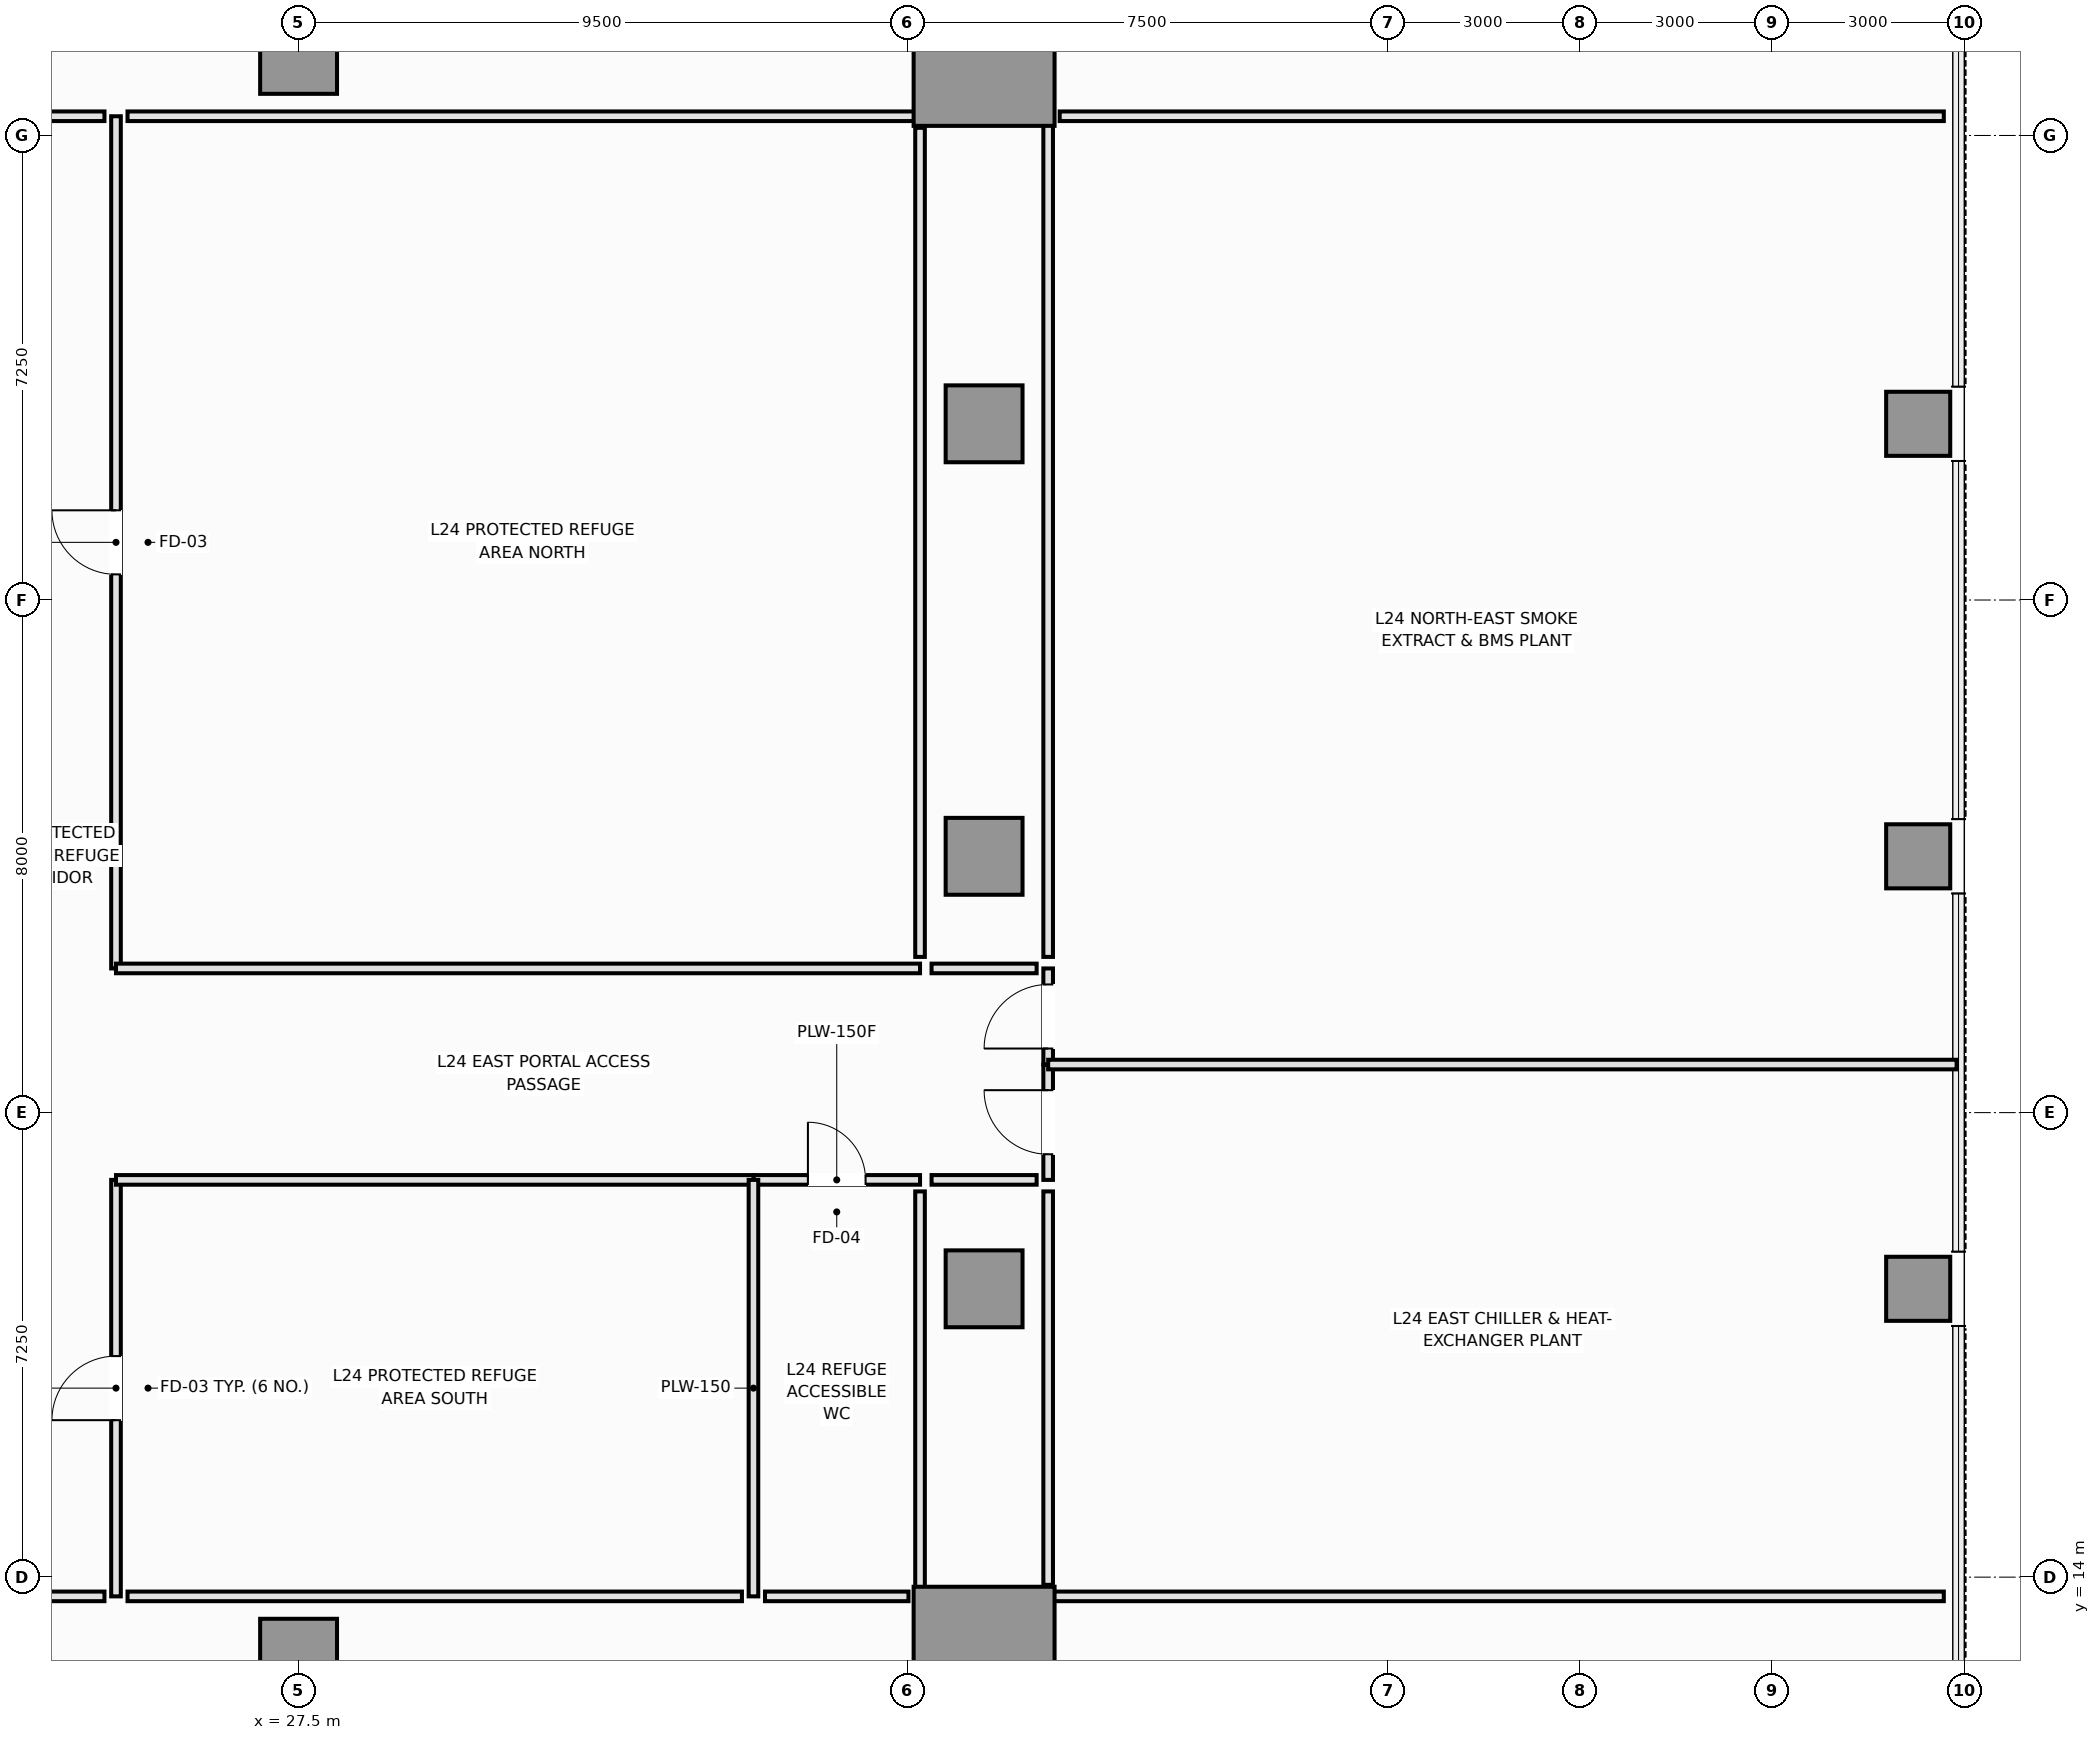
"""IFC4 building model, lengths in metres.
Left out: names, types, materials, properties, quantities, classifications, styles, units other than length and angle.
Written with IfcOpenShell. Run it as: python <this file> out.ifc"""

import sys

from ifc_helpers import new_model, si_unit, direction, frame, frame_2d, origin, origin_2d, place, context, subcontext, project, spatial, rectangle, extrude, element, fill, save


model = new_model("IFC4")
c1 = context("Model", 3, precision=1e-05, world=origin(), true_north=direction((0.0, 1.0)))
c2 = subcontext(c1, "Body", "Model", "MODEL_VIEW")
j1 = project(units=[si_unit("LENGTHUNIT", "METRE"), si_unit("PLANEANGLEUNIT", "RADIAN")], contexts=[c1])
p1 = place(None, origin())
s1 = spatial("IfcSite", under=j1, at=p1, CompositionType="ELEMENT")
p2 = place(p1, origin())
s2 = spatial("IfcBuilding", under=s1, at=p2, CompositionType="ELEMENT")
p3 = place(p2, frame((0.0, 0.0, 93.05)))
s3 = spatial("IfcBuildingStorey", under=s2, at=p3, CompositionType="ELEMENT", Elevation=93.05)
for number, where, z_axis, x_axis in (
    (1, (38.2, 12.75, 0.0), (0.0, 0.0, 1.0), (1.0, 0.0, 0.0)),
    (2, (38.2, 37.75, 0.0), (0.0, 0.0, 1.0), (1.0, 0.0, 0.0)),
):
    element("IfcColumn", number, at=place(p3, frame(where, z_axis=z_axis, x_axis=x_axis)), inside=s3, PredefinedType="COLUMN", context=c2, shape_type="SweptSolid", body=[
        extrude(rectangle(XDim=2.2, YDim=2.2, at=origin_2d()), origin(), (0.0, 0.0, 1.0), 4.8),
    ])
for number, where, z_axis, x_axis in (
    (3, (27.5, 12.75, 0.0), (0.0, 0.0, 1.0), (1.0, 0.0, 0.0)),
    (4, (27.5, 37.75, 0.0), (0.0, 0.0, 1.0), (1.0, 0.0, 0.0)),
    (5, (38.2, 18.5, 0.0), (0.0, 0.0, 1.0), (1.0, 0.0, 0.0)),
    (6, (38.2, 25.25, 0.0), (0.0, 0.0, 1.0), (1.0, 0.0, 0.0)),
    (7, (38.2, 32.0, 0.0), (0.0, 0.0, 1.0), (1.0, 0.0, 0.0)),
):
    element("IfcColumn", number, at=place(p3, frame(where, z_axis=z_axis, x_axis=x_axis)), inside=s3, PredefinedType="COLUMN", context=c2, shape_type="SweptSolid", body=[
        extrude(rectangle(XDim=1.2, YDim=1.2, at=origin_2d()), origin(), (0.0, 0.0, 1.0), 4.8),
    ])
for number, where, z_axis, x_axis in (
    (8, (52.78, 18.5, 0.0), (0.0, 0.0, 1.0), (1.0, 0.0, 0.0)),
    (9, (52.78, 25.25, 0.0), (0.0, 0.0, 1.0), (1.0, 0.0, 0.0)),
    (10, (52.78, 32.0, 0.0), (0.0, 0.0, 1.0), (1.0, 0.0, 0.0)),
):
    element("IfcColumn", number, at=place(p3, frame(where, z_axis=z_axis, x_axis=x_axis)), inside=s3, PredefinedType="COLUMN", context=c2, shape_type="SweptSolid", body=[
        extrude(rectangle(XDim=1.0, YDim=1.0, at=origin_2d()), origin(), (0.0, 0.0, 1.0), 4.8),
    ])
p4 = place(p3, frame((24.65, 13.7, 0.0), z_axis=(0.0, 0.0, 1.0), x_axis=(0.0, 1.0, 0.0)))
e11 = element("IfcWall", 11, at=p4, inside=s3, PredefinedType="PARTITIONING", context=c2, shape_type="SweptSolid", body=[
    extrude(rectangle(XDim=6.5, YDim=0.15, at=frame_2d((3.25, 0.0))), origin(), (0.0, 0.0, 1.0), 4.62),
])
p5 = place(p4, frame((2.75, 0.0, 0.0)))
e12 = element("IfcOpeningElement", 12, at=p5, cuts=e11, PredefinedType="OPENING", context=c2, shape_type="SweptSolid", body=[
    extrude(rectangle(XDim=1.0, YDim=2.15, at=frame_2d((0.5, 1.075))), frame((0.0, 0.085, 0.0), z_axis=(0.0, -1.0, 0.0), x_axis=(1.0, 0.0, 0.0)), (0.0, 0.0, 1.0), 0.17),
])
p6 = place(p3, frame((24.65, 23.5, 0.0), z_axis=(0.0, 0.0, 1.0), x_axis=(0.0, 1.0, 0.0)))
e13 = element("IfcWall", 13, at=p6, inside=s3, PredefinedType="PARTITIONING", context=c2, shape_type="SweptSolid", body=[
    extrude(rectangle(XDim=13.3, YDim=0.15, at=frame_2d((6.65, 0.0))), origin(), (0.0, 0.0, 1.0), 4.62),
])
p7 = place(p6, frame((6.15, 0.0, 0.0)))
e14 = element("IfcOpeningElement", 14, at=p7, cuts=e13, PredefinedType="OPENING", context=c2, shape_type="SweptSolid", body=[
    extrude(rectangle(XDim=1.0, YDim=2.15, at=frame_2d((0.5, 1.075))), frame((0.0, 0.085, 0.0), z_axis=(0.0, -1.0, 0.0), x_axis=(1.0, 0.0, 0.0)), (0.0, 0.0, 1.0), 0.17),
])
p8 = place(p3, frame((34.6, 20.2, 0.0), z_axis=(0.0, 0.0, 1.0), x_axis=(1.0, 0.0, 0.0)))
e15 = element("IfcWall", 15, at=p8, inside=s3, PredefinedType="PLUMBINGWALL", context=c2, shape_type="SweptSolid", body=[
    extrude(rectangle(XDim=2.6, YDim=0.15, at=frame_2d((1.3, 0.0))), origin(), (0.0, 0.0, 1.0), 4.62),
])
p9 = place(p8, frame((0.85, 0.0, 0.0)))
e16 = element("IfcOpeningElement", 16, at=p9, cuts=e15, PredefinedType="OPENING", context=c2, shape_type="SweptSolid", body=[
    extrude(rectangle(XDim=0.9, YDim=2.1, at=frame_2d((0.45, 1.05))), frame((0.0, 0.085, 0.0), z_axis=(0.0, -1.0, 0.0), x_axis=(1.0, 0.0, 0.0)), (0.0, 0.0, 1.0), 0.17),
])
p10 = place(p3, frame((24.65, 20.2, 0.0), z_axis=(0.0, 0.0, 1.0), x_axis=(1.0, 0.0, 0.0)))
e17 = element("IfcWall", 17, at=p10, inside=s3, PredefinedType="PARTITIONING", context=c2, shape_type="SweptSolid", body=[
    extrude(rectangle(XDim=9.95, YDim=0.15, at=frame_2d((4.975, 0.0))), origin(), (0.0, 0.0, 1.0), 4.62),
])
p11 = place(p3, frame((24.65, 23.5, 0.0), z_axis=(0.0, 0.0, 1.0), x_axis=(1.0, 0.0, 0.0)))
e18 = element("IfcWall", 18, at=p11, inside=s3, PredefinedType="PARTITIONING", context=c2, shape_type="SweptSolid", body=[
    extrude(rectangle(XDim=12.55, YDim=0.15, at=frame_2d((6.275, 0.0))), origin(), (0.0, 0.0, 1.0), 4.62),
])
p12 = place(p3, frame((39.2, 20.2, 0.0), z_axis=(0.0, 0.0, 1.0), x_axis=(0.0, 1.0, 0.0)))
e19 = element("IfcWall", 19, at=p12, inside=s3, PredefinedType="PARTITIONING", context=c2, shape_type="SweptSolid", body=[
    extrude(rectangle(XDim=1.8, YDim=0.15, at=frame_2d((0.9, 0.0))), origin(), (0.0, 0.0, 1.0), 4.62),
])
p13 = place(p12, frame((0.4, 0.0, 0.0)))
e20 = element("IfcOpeningElement", 20, at=p13, cuts=e19, PredefinedType="OPENING", context=c2, shape_type="SweptSolid", body=[
    extrude(rectangle(XDim=1.0, YDim=2.15, at=frame_2d((0.5, 1.075))), frame((0.0, 0.085, 0.0), z_axis=(0.0, -1.0, 0.0), x_axis=(1.0, 0.0, 0.0)), (0.0, 0.0, 1.0), 0.17),
])
p14 = place(p3, frame((39.2, 22.0, 0.0), z_axis=(0.0, 0.0, 1.0), x_axis=(0.0, 1.0, 0.0)))
e21 = element("IfcWall", 21, at=p14, inside=s3, PredefinedType="PARTITIONING", context=c2, shape_type="SweptSolid", body=[
    extrude(rectangle(XDim=1.5, YDim=0.15, at=frame_2d((0.75, 0.0))), origin(), (0.0, 0.0, 1.0), 4.62),
])
p15 = place(p14, frame((0.25, 0.0, 0.0)))
e22 = element("IfcOpeningElement", 22, at=p15, cuts=e21, PredefinedType="OPENING", context=c2, shape_type="SweptSolid", body=[
    extrude(rectangle(XDim=1.0, YDim=2.15, at=frame_2d((0.5, 1.075))), frame((0.0, 0.085, 0.0), z_axis=(0.0, -1.0, 0.0), x_axis=(1.0, 0.0, 0.0)), (0.0, 0.0, 1.0), 0.17),
])
p16 = place(p3, frame((34.6, 13.7, 0.0), z_axis=(0.0, 0.0, 1.0), x_axis=(0.0, 1.0, 0.0)))
e23 = element("IfcWall", 23, at=p16, inside=s3, PredefinedType="PLUMBINGWALL", context=c2, shape_type="SweptSolid", body=[
    extrude(rectangle(XDim=6.5, YDim=0.15, at=frame_2d((3.25, 0.0))), origin(), (0.0, 0.0, 1.0), 4.62),
])
p17 = place(p3, frame((39.2, 22.0, 0.0), z_axis=(0.0, 0.0, 1.0), x_axis=(1.0, 0.0, 0.0)))
e24 = element("IfcWall", 24, at=p17, inside=s3, PredefinedType="PARTITIONING", context=c2, shape_type="SweptSolid", body=[
    extrude(rectangle(XDim=14.18, YDim=0.15, at=frame_2d((7.09, 0.0))), origin(), (0.0, 0.0, 1.0), 4.62),
])
p18 = place(p3, frame((20.58, 36.8, 0.0), z_axis=(0.0, 0.0, 1.0), x_axis=(1.0, 0.0, 0.0)))
e25 = element("IfcWall", 25, at=p18, inside=s3, PredefinedType="PARTITIONING", context=c2, shape_type="SweptSolid", body=[
    extrude(rectangle(XDim=3.89, YDim=0.15, at=frame_2d((1.945, 0.0))), origin(), (0.0, 0.0, 1.0), 4.62),
])
p19 = place(p3, frame((24.83, 36.8, 0.0), z_axis=(0.0, 0.0, 1.0), x_axis=(1.0, 0.0, 0.0)))
e26 = element("IfcWall", 26, at=p19, inside=s3, PredefinedType="PARTITIONING", context=c2, shape_type="SweptSolid", body=[
    extrude(rectangle(XDim=12.37, YDim=0.15, at=frame_2d((6.185, 0.0))), origin(), (0.0, 0.0, 1.0), 4.62),
])
p20 = place(p3, frame((37.2, 36.62, 0.0), z_axis=(0.0, 0.0, 1.0), x_axis=(0.0, -1.0, 0.0)))
e27 = element("IfcWall", 27, at=p20, inside=s3, PredefinedType="PARTITIONING", context=c2, shape_type="SweptSolid", body=[
    extrude(rectangle(XDim=12.94, YDim=0.15, at=frame_2d((6.47, 0.0))), origin(), (0.0, 0.0, 1.0), 4.62),
])
p21 = place(p3, frame((37.38, 23.5, 0.0), z_axis=(0.0, 0.0, 1.0), x_axis=(1.0, 0.0, 0.0)))
e28 = element("IfcWall", 28, at=p21, inside=s3, PredefinedType="PARTITIONING", context=c2, shape_type="SweptSolid", body=[
    extrude(rectangle(XDim=1.64, YDim=0.15, at=frame_2d((0.82, 0.0))), origin(), (0.0, 0.0, 1.0), 4.62),
])
p22 = place(p3, frame((39.2, 23.68, 0.0), z_axis=(0.0, 0.0, 1.0), x_axis=(0.0, 1.0, 0.0)))
e29 = element("IfcWall", 29, at=p22, inside=s3, PredefinedType="PARTITIONING", context=c2, shape_type="SweptSolid", body=[
    extrude(rectangle(XDim=13.12, YDim=0.15, at=frame_2d((6.56, 0.0))), origin(), (0.0, 0.0, 1.0), 4.62),
])
p23 = place(p3, frame((39.38, 36.8, 0.0), z_axis=(0.0, 0.0, 1.0), x_axis=(1.0, 0.0, 0.0)))
e30 = element("IfcWall", 30, at=p23, inside=s3, PredefinedType="PARTITIONING", context=c2, shape_type="SweptSolid", body=[
    extrude(rectangle(XDim=13.8, YDim=0.15, at=frame_2d((6.9, 0.0))), origin(), (0.0, 0.0, 1.0), 4.62),
])
p24 = place(p3, frame((53.18, 13.7, 0.0), z_axis=(0.0, 0.0, 1.0), x_axis=(-1.0, 0.0, 0.0)))
e31 = element("IfcWall", 31, at=p24, inside=s3, PredefinedType="PARTITIONING", context=c2, shape_type="SweptSolid", body=[
    extrude(rectangle(XDim=13.98, YDim=0.15, at=frame_2d((6.99, 0.0))), origin(), (0.0, 0.0, 1.0), 4.62),
])
p25 = place(p3, frame((39.2, 13.88, 0.0), z_axis=(0.0, 0.0, 1.0), x_axis=(0.0, 1.0, 0.0)))
e32 = element("IfcWall", 32, at=p25, inside=s3, PredefinedType="PARTITIONING", context=c2, shape_type="SweptSolid", body=[
    extrude(rectangle(XDim=6.14, YDim=0.15, at=frame_2d((3.07, 0.0))), origin(), (0.0, 0.0, 1.0), 4.62),
])
p26 = place(p3, frame((39.02, 20.2, 0.0), z_axis=(0.0, 0.0, 1.0), x_axis=(-1.0, 0.0, 0.0)))
e33 = element("IfcWall", 33, at=p26, inside=s3, PredefinedType="PARTITIONING", context=c2, shape_type="SweptSolid", body=[
    extrude(rectangle(XDim=1.64, YDim=0.15, at=frame_2d((0.82, 0.0))), origin(), (0.0, 0.0, 1.0), 4.62),
])
p27 = place(p3, frame((37.2, 20.02, 0.0), z_axis=(0.0, 0.0, 1.0), x_axis=(0.0, -1.0, 0.0)))
e34 = element("IfcWall", 34, at=p27, inside=s3, PredefinedType="PARTITIONING", context=c2, shape_type="SweptSolid", body=[
    extrude(rectangle(XDim=6.32, YDim=0.15, at=frame_2d((3.16, 0.0))), origin(), (0.0, 0.0, 1.0), 4.62),
])
p28 = place(p3, frame((37.02, 13.7, 0.0), z_axis=(0.0, 0.0, 1.0), x_axis=(-1.0, 0.0, 0.0)))
e35 = element("IfcWall", 35, at=p28, inside=s3, PredefinedType="PARTITIONING", context=c2, shape_type="SweptSolid", body=[
    extrude(rectangle(XDim=2.24, YDim=0.15, at=frame_2d((1.12, 0.0))), origin(), (0.0, 0.0, 1.0), 4.62),
])
p29 = place(p3, frame((34.42, 13.7, 0.0), z_axis=(0.0, 0.0, 1.0), x_axis=(-1.0, 0.0, 0.0)))
e36 = element("IfcWall", 36, at=p29, inside=s3, PredefinedType="PARTITIONING", context=c2, shape_type="SweptSolid", body=[
    extrude(rectangle(XDim=9.59, YDim=0.15, at=frame_2d((4.795, 0.0))), origin(), (0.0, 0.0, 1.0), 4.62),
])
p30 = place(p3, frame((24.47, 13.7, 0.0), z_axis=(0.0, 0.0, 1.0), x_axis=(-1.0, 0.0, 0.0)))
e37 = element("IfcWall", 37, at=p30, inside=s3, PredefinedType="PARTITIONING", context=c2, shape_type="SweptSolid", body=[
    extrude(rectangle(XDim=4.07, YDim=0.15, at=frame_2d((2.035, 0.0))), origin(), (0.0, 0.0, 1.0), 4.62),
])
p31 = place(p5, origin())
e38 = element("IfcDoor", 38, at=p31, inside=s3, OperationType="SINGLE_SWING_LEFT", PredefinedType="DOOR", context=c2, shape_type="SweptSolid", body=[
    extrude(rectangle(XDim=1.0, YDim=2.15, at=frame_2d((0.5, 1.075))), frame((0.0, 0.025, 0.0), z_axis=(0.0, -1.0, 0.0), x_axis=(1.0, 0.0, 0.0)), (0.0, 0.0, 1.0), 0.05),
])
fill(e12, e38)
p32 = place(p7, origin())
e39 = element("IfcDoor", 39, at=p32, inside=s3, OperationType="SINGLE_SWING_RIGHT", PredefinedType="DOOR", context=c2, shape_type="SweptSolid", body=[
    extrude(rectangle(XDim=1.0, YDim=2.15, at=frame_2d((0.5, 1.075))), frame((0.0, 0.025, 0.0), z_axis=(0.0, -1.0, 0.0), x_axis=(1.0, 0.0, 0.0)), (0.0, 0.0, 1.0), 0.05),
])
fill(e14, e39)
p33 = place(p9, origin())
e40 = element("IfcDoor", 40, at=p33, inside=s3, OperationType="SINGLE_SWING_LEFT", PredefinedType="DOOR", context=c2, shape_type="SweptSolid", body=[
    extrude(rectangle(XDim=0.9, YDim=2.1, at=frame_2d((0.45, 1.05))), frame((0.0, 0.025, 0.0), z_axis=(0.0, -1.0, 0.0), x_axis=(1.0, 0.0, 0.0)), (0.0, 0.0, 1.0), 0.05),
])
fill(e16, e40)
p34 = place(p13, origin())
e41 = element("IfcDoor", 41, at=p34, inside=s3, OperationType="SINGLE_SWING_RIGHT", PredefinedType="DOOR", context=c2, shape_type="SweptSolid", body=[
    extrude(rectangle(XDim=1.0, YDim=2.15, at=frame_2d((0.5, 1.075))), frame((0.0, 0.025, 0.0), z_axis=(0.0, -1.0, 0.0), x_axis=(1.0, 0.0, 0.0)), (0.0, 0.0, 1.0), 0.05),
])
fill(e20, e41)
p35 = place(p15, origin())
e42 = element("IfcDoor", 42, at=p35, inside=s3, OperationType="SINGLE_SWING_LEFT", PredefinedType="DOOR", context=c2, shape_type="SweptSolid", body=[
    extrude(rectangle(XDim=1.0, YDim=2.15, at=frame_2d((0.5, 1.075))), frame((0.0, 0.025, 0.0), z_axis=(0.0, -1.0, 0.0), x_axis=(1.0, 0.0, 0.0)), (0.0, 0.0, 1.0), 0.05),
])
fill(e22, e42)
save(model, sys.argv[1])
